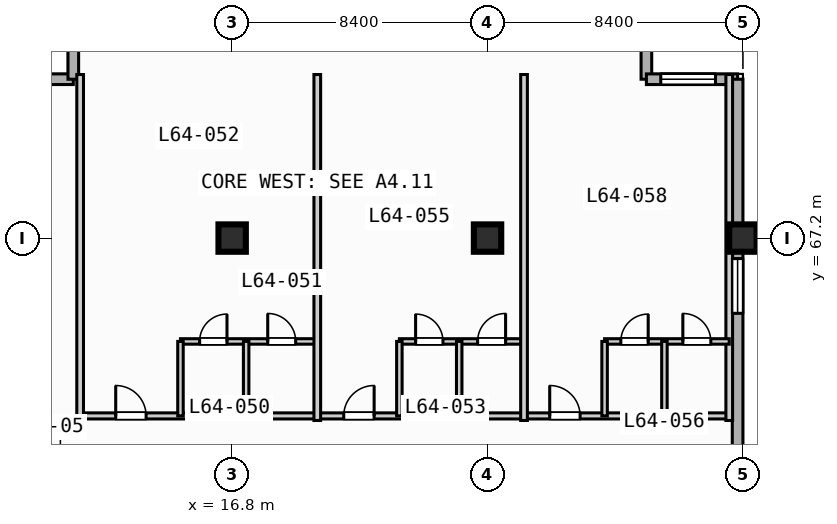
"""IFC4 building model, lengths in metres.
Left out: names, types, materials, properties, quantities, classifications, styles, units other than length and angle.
Written with IfcOpenShell. Run it as: python <this file> out.ifc"""

import sys

from ifc_helpers import new_model, si_unit, direction, frame, frame_2d, origin, origin_2d, place, context, subcontext, project, spatial, rectangle, extrude, element, fill, save


model = new_model("IFC4")
c1 = context("Model", 3, precision=1e-05, world=origin(), true_north=direction((0.0, 1.0)))
c2 = subcontext(c1, "Body", "Model", "MODEL_VIEW")
j1 = project(units=[si_unit("LENGTHUNIT", "METRE"), si_unit("PLANEANGLEUNIT", "RADIAN")], contexts=[c1])
p1 = place(None, origin())
s1 = spatial("IfcSite", under=j1, at=p1, CompositionType="ELEMENT")
p2 = place(p1, origin())
s2 = spatial("IfcBuilding", under=s1, at=p2, CompositionType="ELEMENT")
p3 = place(p2, frame((0.0, 0.0, 260.1)))
s3 = spatial("IfcBuildingStorey", under=s2, at=p3, CompositionType="ELEMENT", Elevation=260.1)
for number, where, z_axis, x_axis in (
    (1, (16.8, 67.2, 0.0), (0.0, 0.0, 1.0), (1.0, 0.0, 0.0)),
    (2, (25.2, 67.2, 0.0), (0.0, 0.0, 1.0), (1.0, 0.0, 0.0)),
    (3, (33.6, 67.2, 0.0), (0.0, 0.0, 1.0), (1.0, 0.0, 0.0)),
):
    element("IfcColumn", number, at=place(p3, frame(where, z_axis=z_axis, x_axis=x_axis)), inside=s3, PredefinedType="COLUMN", context=c2, shape_type="SweptSolid", body=[
        extrude(rectangle(XDim=0.9, YDim=0.9, at=origin_2d()), origin(), (0.0, 0.0, 1.0), 3.7),
    ])
for number, where, z_axis, x_axis in (
    (4, (8.575, 72.425, 0.0), (0.0, 0.0, 1.0), (1.0, 0.0, 0.0)),
    (5, (11.575, 72.425, 0.0), (0.0, 0.0, 1.0), (0.0, 1.0, 0.0)),
    (6, (30.425, 75.425, 0.0), (0.0, 0.0, 1.0), (0.0, -1.0, 0.0)),
):
    element("IfcWall", number, at=place(p3, frame(where, z_axis=z_axis, x_axis=x_axis)), inside=s3, PredefinedType="STANDARD", context=c2, shape_type="SweptSolid", body=[
        extrude(rectangle(XDim=3.0, YDim=0.35, at=frame_2d((1.5, 0.0))), origin(), (0.0, 0.0, 1.0), 3.47),
    ])
p4 = place(p3, frame((30.425, 72.425, 0.0), z_axis=(0.0, 0.0, 1.0), x_axis=(1.0, 0.0, 0.0)))
e7 = element("IfcWall", 7, at=p4, inside=s3, PredefinedType="STANDARD", context=c2, shape_type="SweptSolid", body=[
    extrude(rectangle(XDim=3.0, YDim=0.35, at=frame_2d((1.5, 0.0))), origin(), (0.0, 0.0, 1.0), 3.47),
])
p5 = place(p4, frame((0.472, 0.0, 0.85)))
e8 = element("IfcOpeningElement", 8, at=p5, cuts=e7, PredefinedType="OPENING", context=c2, shape_type="SweptSolid", body=[
    extrude(rectangle(XDim=1.8, YDim=1.8, at=frame_2d((0.9, 0.9))), frame((0.0, 0.185, 0.0), z_axis=(0.0, -1.0, 0.0), x_axis=(1.0, 0.0, 0.0)), (0.0, 0.0, 1.0), 0.37),
])
p6 = place(p3, frame((33.425, 72.425, 0.0), z_axis=(0.0, 0.0, 1.0), x_axis=(0.0, -1.0, 0.0)))
e9 = element("IfcWall", 9, at=p6, inside=s3, PredefinedType="STANDARD", context=c2, shape_type="SweptSolid", body=[
    extrude(rectangle(XDim=39.0, YDim=0.35, at=frame_2d((19.5, 0.0))), origin(), (0.0, 0.0, 1.0), 3.47),
])
p7 = place(p6, frame((5.9, 0.0, 0.85)))
e10 = element("IfcOpeningElement", 10, at=p7, cuts=e9, PredefinedType="OPENING", context=c2, shape_type="SweptSolid", body=[
    extrude(rectangle(XDim=1.8, YDim=1.8, at=frame_2d((0.9, 0.9))), frame((0.0, 0.185, 0.0), z_axis=(0.0, -1.0, 0.0), x_axis=(1.0, 0.0, 0.0)), (0.0, 0.0, 1.0), 0.37),
])
p8 = place(p3, frame((11.8, 61.35, 0.0), z_axis=(0.0, 0.0, 1.0), x_axis=(1.0, 0.0, 0.0)))
e11 = element("IfcWall", 11, at=p8, inside=s3, PredefinedType="PARTITIONING", context=c2, shape_type="SweptSolid", body=[
    extrude(rectangle(XDim=21.35, YDim=0.2, at=frame_2d((10.675, 0.0))), origin(), (0.0, 0.0, 1.0), 3.47),
])
p9 = place(p8, frame((1.17, 0.0, 0.0)))
e12 = element("IfcOpeningElement", 12, at=p9, cuts=e11, PredefinedType="OPENING", context=c2, shape_type="SweptSolid", body=[
    extrude(rectangle(XDim=1.0, YDim=2.15, at=frame_2d((0.5, 1.075))), frame((0.0, 0.11, 0.0), z_axis=(0.0, -1.0, 0.0), x_axis=(1.0, 0.0, 0.0)), (0.0, 0.0, 1.0), 0.22),
])
p10 = place(p8, frame((8.67, 0.0, 0.0)))
e13 = element("IfcOpeningElement", 13, at=p10, cuts=e11, PredefinedType="OPENING", context=c2, shape_type="SweptSolid", body=[
    extrude(rectangle(XDim=1.0, YDim=2.15, at=frame_2d((0.5, 1.075))), frame((0.0, 0.11, 0.0), z_axis=(0.0, -1.0, 0.0), x_axis=(1.0, 0.0, 0.0)), (0.0, 0.0, 1.0), 0.22),
])
p11 = place(p8, frame((15.445, 0.0, 0.0)))
e14 = element("IfcOpeningElement", 14, at=p11, cuts=e11, PredefinedType="OPENING", context=c2, shape_type="SweptSolid", body=[
    extrude(rectangle(XDim=1.0, YDim=2.15, at=frame_2d((0.5, 1.075))), frame((0.0, 0.11, 0.0), z_axis=(0.0, -1.0, 0.0), x_axis=(1.0, 0.0, 0.0)), (0.0, 0.0, 1.0), 0.22),
])
p12 = place(p3, frame((11.8, 61.2, 0.0), z_axis=(0.0, 0.0, 1.0), x_axis=(0.0, 1.0, 0.0)))
e15 = element("IfcWall", 15, at=p12, inside=s3, PredefinedType="PARTITIONING", context=c2, shape_type="SweptSolid", body=[
    extrude(rectangle(XDim=11.38, YDim=0.22, at=frame_2d((5.69, 0.0))), origin(), (0.0, 0.0, 1.0), 3.47),
])
p13 = place(p3, frame((15.1, 63.8, 0.0), z_axis=(0.0, 0.0, 1.0), x_axis=(1.0, 0.0, 0.0)))
e16 = element("IfcWall", 16, at=p13, inside=s3, PredefinedType="PLUMBINGWALL", context=c2, shape_type="SweptSolid", body=[
    extrude(rectangle(XDim=4.5, YDim=0.18, at=frame_2d((2.25, 0.0))), origin(), (0.0, 0.0, 1.0), 3.47),
])
p14 = place(p13, frame((0.63, 0.0, 0.0)))
e17 = element("IfcOpeningElement", 17, at=p14, cuts=e16, PredefinedType="OPENING", context=c2, shape_type="SweptSolid", body=[
    extrude(rectangle(XDim=0.9, YDim=2.1, at=frame_2d((0.45, 1.05))), frame((0.0, 0.1, 0.0), z_axis=(0.0, -1.0, 0.0), x_axis=(1.0, 0.0, 0.0)), (0.0, 0.0, 1.0), 0.2),
])
p15 = place(p13, frame((2.87, 0.0, 0.0)))
e18 = element("IfcOpeningElement", 18, at=p15, cuts=e16, PredefinedType="OPENING", context=c2, shape_type="SweptSolid", body=[
    extrude(rectangle(XDim=0.92, YDim=2.1, at=frame_2d((0.46, 1.05))), frame((0.0, 0.1, 0.0), z_axis=(0.0, -1.0, 0.0), x_axis=(1.0, 0.0, 0.0)), (0.0, 0.0, 1.0), 0.2),
])
for number, where, z_axis, x_axis in (
    (19, (15.1, 61.35, 0.0), (0.0, 0.0, 1.0), (0.0, 1.0, 0.0)),
    (20, (17.26, 61.35, 0.0), (0.0, 0.0, 1.0), (0.0, 1.0, 0.0)),
):
    element("IfcWall", number, at=place(p3, frame(where, z_axis=z_axis, x_axis=x_axis)), inside=s3, PredefinedType="PLUMBINGWALL", context=c2, shape_type="SweptSolid", body=[
        extrude(rectangle(XDim=2.45, YDim=0.18, at=frame_2d((1.225, 0.0))), origin(), (0.0, 0.0, 1.0), 3.47),
    ])
p16 = place(p3, frame((19.6, 61.2, 0.0), z_axis=(0.0, 0.0, 1.0), x_axis=(0.0, 1.0, 0.0)))
e21 = element("IfcWall", 21, at=p16, inside=s3, PredefinedType="PARTITIONING", context=c2, shape_type="SweptSolid", body=[
    extrude(rectangle(XDim=11.38, YDim=0.22, at=frame_2d((5.69, 0.0))), origin(), (0.0, 0.0, 1.0), 3.47),
])
p17 = place(p3, frame((22.3, 63.8, 0.0), z_axis=(0.0, 0.0, 1.0), x_axis=(1.0, 0.0, 0.0)))
e22 = element("IfcWall", 22, at=p17, inside=s3, PredefinedType="PLUMBINGWALL", context=c2, shape_type="SweptSolid", body=[
    extrude(rectangle(XDim=4.1, YDim=0.18, at=frame_2d((2.05, 0.0))), origin(), (0.0, 0.0, 1.0), 3.47),
])
p18 = place(p17, frame((0.534, 0.0, 0.0)))
e23 = element("IfcOpeningElement", 23, at=p18, cuts=e22, PredefinedType="OPENING", context=c2, shape_type="SweptSolid", body=[
    extrude(rectangle(XDim=0.9, YDim=2.1, at=frame_2d((0.45, 1.05))), frame((0.0, 0.1, 0.0), z_axis=(0.0, -1.0, 0.0), x_axis=(1.0, 0.0, 0.0)), (0.0, 0.0, 1.0), 0.2),
])
p19 = place(p17, frame((2.574, 0.0, 0.0)))
e24 = element("IfcOpeningElement", 24, at=p19, cuts=e22, PredefinedType="OPENING", context=c2, shape_type="SweptSolid", body=[
    extrude(rectangle(XDim=0.92, YDim=2.1, at=frame_2d((0.46, 1.05))), frame((0.0, 0.1, 0.0), z_axis=(0.0, -1.0, 0.0), x_axis=(1.0, 0.0, 0.0)), (0.0, 0.0, 1.0), 0.2),
])
for number, where, z_axis, x_axis in (
    (25, (22.3, 61.35, 0.0), (0.0, 0.0, 1.0), (0.0, 1.0, 0.0)),
    (26, (24.268, 61.35, 0.0), (0.0, 0.0, 1.0), (0.0, 1.0, 0.0)),
):
    element("IfcWall", number, at=place(p3, frame(where, z_axis=z_axis, x_axis=x_axis)), inside=s3, PredefinedType="PLUMBINGWALL", context=c2, shape_type="SweptSolid", body=[
        extrude(rectangle(XDim=2.45, YDim=0.18, at=frame_2d((1.225, 0.0))), origin(), (0.0, 0.0, 1.0), 3.47),
    ])
for number, where, z_axis, x_axis in (
    (27, (26.4, 61.2, 0.0), (0.0, 0.0, 1.0), (0.0, 1.0, 0.0)),
    (28, (33.15, 61.2, 0.0), (0.0, 0.0, 1.0), (0.0, 1.0, 0.0)),
):
    element("IfcWall", number, at=place(p3, frame(where, z_axis=z_axis, x_axis=x_axis)), inside=s3, PredefinedType="PARTITIONING", context=c2, shape_type="SweptSolid", body=[
        extrude(rectangle(XDim=11.38, YDim=0.22, at=frame_2d((5.69, 0.0))), origin(), (0.0, 0.0, 1.0), 3.47),
    ])
p20 = place(p3, frame((29.05, 63.8, 0.0), z_axis=(0.0, 0.0, 1.0), x_axis=(1.0, 0.0, 0.0)))
e29 = element("IfcWall", 29, at=p20, inside=s3, PredefinedType="PLUMBINGWALL", context=c2, shape_type="SweptSolid", body=[
    extrude(rectangle(XDim=4.1, YDim=0.18, at=frame_2d((2.05, 0.0))), origin(), (0.0, 0.0, 1.0), 3.47),
])
p21 = place(p20, frame((0.534, 0.0, 0.0)))
e30 = element("IfcOpeningElement", 30, at=p21, cuts=e29, PredefinedType="OPENING", context=c2, shape_type="SweptSolid", body=[
    extrude(rectangle(XDim=0.9, YDim=2.1, at=frame_2d((0.45, 1.05))), frame((0.0, 0.1, 0.0), z_axis=(0.0, -1.0, 0.0), x_axis=(1.0, 0.0, 0.0)), (0.0, 0.0, 1.0), 0.2),
])
p22 = place(p20, frame((2.574, 0.0, 0.0)))
e31 = element("IfcOpeningElement", 31, at=p22, cuts=e29, PredefinedType="OPENING", context=c2, shape_type="SweptSolid", body=[
    extrude(rectangle(XDim=0.92, YDim=2.1, at=frame_2d((0.46, 1.05))), frame((0.0, 0.1, 0.0), z_axis=(0.0, -1.0, 0.0), x_axis=(1.0, 0.0, 0.0)), (0.0, 0.0, 1.0), 0.2),
])
for number, where, z_axis, x_axis in (
    (32, (29.05, 61.35, 0.0), (0.0, 0.0, 1.0), (0.0, 1.0, 0.0)),
    (33, (31.018, 61.35, 0.0), (0.0, 0.0, 1.0), (0.0, 1.0, 0.0)),
):
    element("IfcWall", number, at=place(p3, frame(where, z_axis=z_axis, x_axis=x_axis)), inside=s3, PredefinedType="PLUMBINGWALL", context=c2, shape_type="SweptSolid", body=[
        extrude(rectangle(XDim=2.45, YDim=0.18, at=frame_2d((1.225, 0.0))), origin(), (0.0, 0.0, 1.0), 3.47),
    ])
p23 = place(p5, origin())
e34 = element("IfcWindow", 34, at=p23, inside=s3, PartitioningType="SINGLE_PANEL", PredefinedType="WINDOW", context=c2, shape_type="SweptSolid", body=[
    extrude(rectangle(XDim=1.8, YDim=1.8, at=frame_2d((0.9, 0.9))), frame((0.0, 0.03, 0.0), z_axis=(0.0, -1.0, 0.0), x_axis=(1.0, 0.0, 0.0)), (0.0, 0.0, 1.0), 0.06),
])
fill(e8, e34)
p24 = place(p7, origin())
e35 = element("IfcWindow", 35, at=p24, inside=s3, PartitioningType="SINGLE_PANEL", PredefinedType="WINDOW", context=c2, shape_type="SweptSolid", body=[
    extrude(rectangle(XDim=1.8, YDim=1.8, at=frame_2d((0.9, 0.9))), frame((0.0, 0.03, 0.0), z_axis=(0.0, -1.0, 0.0), x_axis=(1.0, 0.0, 0.0)), (0.0, 0.0, 1.0), 0.06),
])
fill(e10, e35)
p25 = place(p9, origin())
e36 = element("IfcDoor", 36, at=p25, inside=s3, OperationType="SINGLE_SWING_LEFT", PredefinedType="DOOR", context=c2, shape_type="SweptSolid", body=[
    extrude(rectangle(XDim=1.0, YDim=2.15, at=frame_2d((0.5, 1.075))), frame((0.0, 0.025, 0.0), z_axis=(0.0, -1.0, 0.0), x_axis=(1.0, 0.0, 0.0)), (0.0, 0.0, 1.0), 0.05),
])
fill(e12, e36)
p26 = place(p10, origin())
e37 = element("IfcDoor", 37, at=p26, inside=s3, OperationType="SINGLE_SWING_RIGHT", PredefinedType="DOOR", context=c2, shape_type="SweptSolid", body=[
    extrude(rectangle(XDim=1.0, YDim=2.15, at=frame_2d((0.5, 1.075))), frame((0.0, 0.025, 0.0), z_axis=(0.0, -1.0, 0.0), x_axis=(1.0, 0.0, 0.0)), (0.0, 0.0, 1.0), 0.05),
])
fill(e13, e37)
p27 = place(p11, origin())
e38 = element("IfcDoor", 38, at=p27, inside=s3, OperationType="SINGLE_SWING_LEFT", PredefinedType="DOOR", context=c2, shape_type="SweptSolid", body=[
    extrude(rectangle(XDim=1.0, YDim=2.15, at=frame_2d((0.5, 1.075))), frame((0.0, 0.025, 0.0), z_axis=(0.0, -1.0, 0.0), x_axis=(1.0, 0.0, 0.0)), (0.0, 0.0, 1.0), 0.05),
])
fill(e14, e38)
p28 = place(p14, origin())
e39 = element("IfcDoor", 39, at=p28, inside=s3, OperationType="SINGLE_SWING_RIGHT", PredefinedType="DOOR", context=c2, shape_type="SweptSolid", body=[
    extrude(rectangle(XDim=0.9, YDim=2.1, at=frame_2d((0.45, 1.05))), frame((0.0, 0.025, 0.0), z_axis=(0.0, -1.0, 0.0), x_axis=(1.0, 0.0, 0.0)), (0.0, 0.0, 1.0), 0.05),
])
fill(e17, e39)
p29 = place(p15, origin())
e40 = element("IfcDoor", 40, at=p29, inside=s3, OperationType="SINGLE_SWING_LEFT", PredefinedType="DOOR", context=c2, shape_type="SweptSolid", body=[
    extrude(rectangle(XDim=0.92, YDim=2.1, at=frame_2d((0.46, 1.05))), frame((0.0, 0.025, 0.0), z_axis=(0.0, -1.0, 0.0), x_axis=(1.0, 0.0, 0.0)), (0.0, 0.0, 1.0), 0.05),
])
fill(e18, e40)
p30 = place(p18, origin())
e41 = element("IfcDoor", 41, at=p30, inside=s3, OperationType="SINGLE_SWING_LEFT", PredefinedType="DOOR", context=c2, shape_type="SweptSolid", body=[
    extrude(rectangle(XDim=0.9, YDim=2.1, at=frame_2d((0.45, 1.05))), frame((0.0, 0.025, 0.0), z_axis=(0.0, -1.0, 0.0), x_axis=(1.0, 0.0, 0.0)), (0.0, 0.0, 1.0), 0.05),
])
fill(e23, e41)
p31 = place(p19, origin())
e42 = element("IfcDoor", 42, at=p31, inside=s3, OperationType="SINGLE_SWING_RIGHT", PredefinedType="DOOR", context=c2, shape_type="SweptSolid", body=[
    extrude(rectangle(XDim=0.92, YDim=2.1, at=frame_2d((0.46, 1.05))), frame((0.0, 0.025, 0.0), z_axis=(0.0, -1.0, 0.0), x_axis=(1.0, 0.0, 0.0)), (0.0, 0.0, 1.0), 0.05),
])
fill(e24, e42)
p32 = place(p21, origin())
e43 = element("IfcDoor", 43, at=p32, inside=s3, OperationType="SINGLE_SWING_RIGHT", PredefinedType="DOOR", context=c2, shape_type="SweptSolid", body=[
    extrude(rectangle(XDim=0.9, YDim=2.1, at=frame_2d((0.45, 1.05))), frame((0.0, 0.025, 0.0), z_axis=(0.0, -1.0, 0.0), x_axis=(1.0, 0.0, 0.0)), (0.0, 0.0, 1.0), 0.05),
])
fill(e30, e43)
p33 = place(p22, origin())
e44 = element("IfcDoor", 44, at=p33, inside=s3, OperationType="SINGLE_SWING_LEFT", PredefinedType="DOOR", context=c2, shape_type="SweptSolid", body=[
    extrude(rectangle(XDim=0.92, YDim=2.1, at=frame_2d((0.46, 1.05))), frame((0.0, 0.025, 0.0), z_axis=(0.0, -1.0, 0.0), x_axis=(1.0, 0.0, 0.0)), (0.0, 0.0, 1.0), 0.05),
])
fill(e31, e44)
save(model, sys.argv[1])
